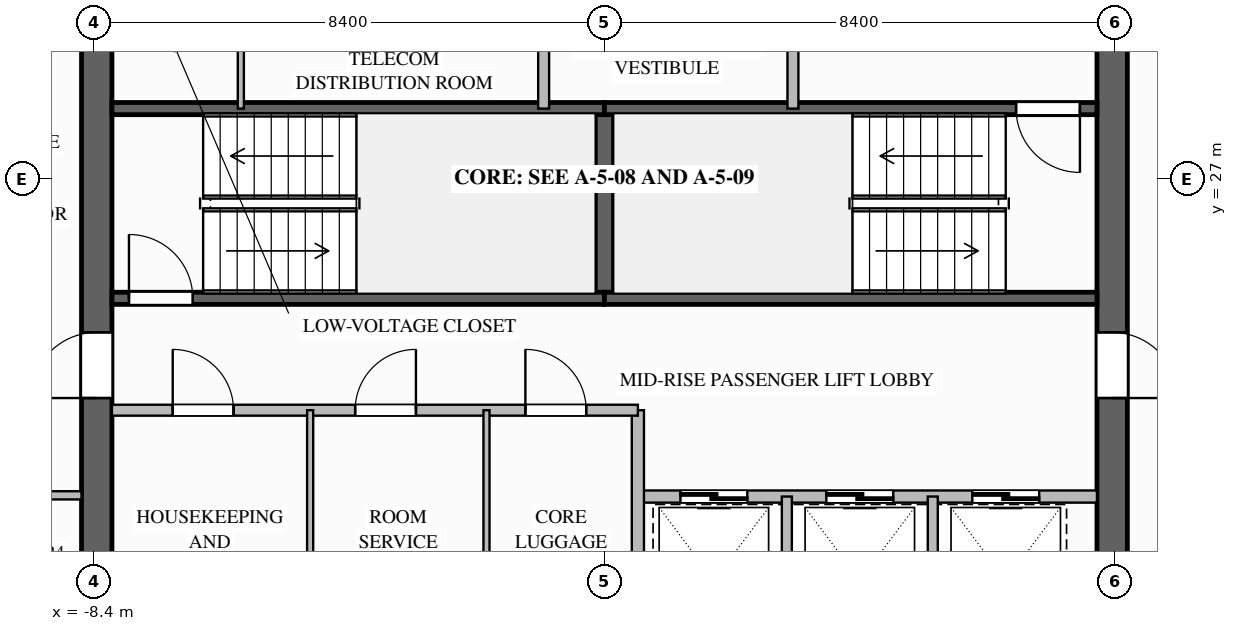
"""IFC4 building model, lengths in metres.
Left out: names, types, materials, properties, quantities, classifications, styles, units other than length and angle.
Written with IfcOpenShell. Run it as: python <this file> out.ifc"""

import sys

from ifc_helpers import new_model, si_unit, direction, frame, frame_2d, origin, place, context, subcontext, project, spatial, rectangle, extrude, element, fill, save


model = new_model("IFC4")
c1 = context("Model", 3, precision=1e-05, world=origin(), true_north=direction((0.0, 1.0)))
c2 = subcontext(c1, "Body", "Model", "MODEL_VIEW")
j1 = project(units=[si_unit("LENGTHUNIT", "METRE"), si_unit("PLANEANGLEUNIT", "RADIAN")], contexts=[c1])
p1 = place(None, origin())
s1 = spatial("IfcSite", under=j1, at=p1, CompositionType="ELEMENT")
p2 = place(p1, origin())
s2 = spatial("IfcBuilding", under=s1, at=p2, CompositionType="ELEMENT")
p3 = place(p2, frame((0.0, 0.0, 193.0)))
s3 = spatial("IfcBuildingStorey", under=s2, at=p3, CompositionType="ELEMENT", Elevation=193.0)
p4 = place(p3, frame((8.35, 35.1, 0.0), z_axis=(0.0, 0.0, 1.0), x_axis=(0.0, -1.0, 0.0)))
e1 = element("IfcWall", 1, at=p4, inside=s3, PredefinedType="SHEAR", context=c2, shape_type="SweptSolid", body=[
    extrude(rectangle(XDim=16.2, YDim=0.5, at=frame_2d((8.1, 0.0))), origin(), (0.0, 0.0, 1.0), 3.55),
])
p5 = place(p4, frame((3.08, 0.0, 0.0)))
e2 = element("IfcOpeningElement", 2, at=p5, cuts=e1, PredefinedType="OPENING", context=c2, shape_type="SweptSolid", body=[
    extrude(rectangle(XDim=1.12, YDim=2.1, at=frame_2d((0.56, 1.05))), frame((0.0, 0.26, 0.0), z_axis=(0.0, -1.0, 0.0), x_axis=(1.0, 0.0, 0.0)), (0.0, 0.0, 1.0), 0.52),
])
p6 = place(p4, frame((10.62, 0.0, 0.0)))
e3 = element("IfcOpeningElement", 3, at=p6, cuts=e1, PredefinedType="OPENING", context=c2, shape_type="SweptSolid", body=[
    extrude(rectangle(XDim=1.08, YDim=2.04, at=frame_2d((0.54, 1.02))), frame((0.0, 0.26, 0.0), z_axis=(0.0, -1.0, 0.0), x_axis=(1.0, 0.0, 0.0)), (0.0, 0.0, 1.0), 0.52),
])
p7 = place(p3, frame((-8.35, 18.9, 0.0), z_axis=(0.0, 0.0, 1.0), x_axis=(0.0, 1.0, 0.0)))
e4 = element("IfcWall", 4, at=p7, inside=s3, PredefinedType="SHEAR", context=c2, shape_type="SweptSolid", body=[
    extrude(rectangle(XDim=16.2, YDim=0.5, at=frame_2d((8.1, 0.0))), origin(), (0.0, 0.0, 1.0), 3.55),
])
p8 = place(p7, frame((12.02, 0.0, 0.0)))
e5 = element("IfcOpeningElement", 5, at=p8, cuts=e4, PredefinedType="OPENING", context=c2, shape_type="SweptSolid", body=[
    extrude(rectangle(XDim=1.08, YDim=2.04, at=frame_2d((0.54, 1.02))), frame((0.0, 0.26, 0.0), z_axis=(0.0, -1.0, 0.0), x_axis=(1.0, 0.0, 0.0)), (0.0, 0.0, 1.0), 0.52),
])
p9 = place(p7, frame((4.5, 0.0, 0.0)))
e6 = element("IfcOpeningElement", 6, at=p9, cuts=e4, PredefinedType="OPENING", context=c2, shape_type="SweptSolid", body=[
    extrude(rectangle(XDim=1.08, YDim=2.04, at=frame_2d((0.54, 1.02))), frame((0.0, 0.26, 0.0), z_axis=(0.0, -1.0, 0.0), x_axis=(1.0, 0.0, 0.0)), (0.0, 0.0, 1.0), 0.52),
])
p10 = place(p3, frame((0.0, 25.04, 0.0), z_axis=(0.0, 0.0, 1.0), x_axis=(0.0, 1.0, 0.0)))
e7 = element("IfcWall", 7, at=p10, inside=s3, PredefinedType="SOLIDWALL", context=c2, shape_type="SweptSolid", body=[
    extrude(rectangle(XDim=3.12, YDim=0.3, at=frame_2d((1.56, 0.0))), origin(), (0.0, 0.0, 1.0), 3.29),
])
p11 = place(p3, frame((-8.1, 25.04, 0.0), z_axis=(0.0, 0.0, 1.0), x_axis=(1.0, 0.0, 0.0)))
e8 = element("IfcWall", 8, at=p11, inside=s3, PredefinedType="SOLIDWALL", context=c2, shape_type="SweptSolid", body=[
    extrude(rectangle(XDim=8.1, YDim=0.2, at=frame_2d((4.05, 0.0))), origin(), (0.0, 0.0, 1.0), 3.29),
])
p12 = place(p11, frame((0.28, 0.0, 0.0)))
e9 = element("IfcOpeningElement", 9, at=p12, cuts=e8, PredefinedType="OPENING", context=c2, shape_type="SweptSolid", body=[
    extrude(rectangle(XDim=1.05, YDim=2.1, at=frame_2d((0.525, 1.05))), frame((0.0, 0.11, 0.0), z_axis=(0.0, -1.0, 0.0), x_axis=(1.0, 0.0, 0.0)), (0.0, 0.0, 1.0), 0.22),
])
for number, where, z_axis, x_axis in (
    (10, (-8.1, 28.16, 0.0), (0.0, 0.0, 1.0), (1.0, 0.0, 0.0)),
    (11, (0.0, 25.04, 0.0), (0.0, 0.0, 1.0), (1.0, 0.0, 0.0)),
):
    element("IfcWall", number, at=place(p3, frame(where, z_axis=z_axis, x_axis=x_axis)), inside=s3, PredefinedType="SOLIDWALL", context=c2, shape_type="SweptSolid", body=[
        extrude(rectangle(XDim=8.1, YDim=0.2, at=frame_2d((4.05, 0.0))), origin(), (0.0, 0.0, 1.0), 3.29),
    ])
p13 = place(p3, frame((8.1, 28.16, 0.0), z_axis=(0.0, 0.0, 1.0), x_axis=(-1.0, 0.0, 0.0)))
e12 = element("IfcWall", 12, at=p13, inside=s3, PredefinedType="SOLIDWALL", context=c2, shape_type="SweptSolid", body=[
    extrude(rectangle(XDim=8.1, YDim=0.2, at=frame_2d((4.05, 0.0))), origin(), (0.0, 0.0, 1.0), 3.29),
])
p14 = place(p13, frame((0.28, 0.0, 0.0)))
e13 = element("IfcOpeningElement", 13, at=p14, cuts=e12, PredefinedType="OPENING", context=c2, shape_type="SweptSolid", body=[
    extrude(rectangle(XDim=1.05, YDim=2.1, at=frame_2d((0.525, 1.05))), frame((0.0, 0.11, 0.0), z_axis=(0.0, -1.0, 0.0), x_axis=(1.0, 0.0, 0.0)), (0.0, 0.0, 1.0), 0.22),
])
p15 = place(p3, frame((3.1, 28.16, 0.0), z_axis=(0.0, 0.0, 1.0), x_axis=(0.0, 1.0, 0.0)))
e14 = element("IfcWall", 14, at=p15, inside=s3, PredefinedType="SOLIDWALL", context=c2, shape_type="SweptSolid", body=[
    extrude(rectangle(XDim=4.06, YDim=0.18, at=frame_2d((2.03, 0.0))), origin(), (0.0, 0.0, 1.0), 3.29),
])
p16 = place(p15, frame((1.4, 0.0, 0.0)))
e15 = element("IfcOpeningElement", 15, at=p16, cuts=e14, PredefinedType="OPENING", context=c2, shape_type="SweptSolid", body=[
    extrude(rectangle(XDim=1.12, YDim=2.1, at=frame_2d((0.56, 1.05))), frame((0.0, 0.1, 0.0), z_axis=(0.0, -1.0, 0.0), x_axis=(1.0, 0.0, 0.0)), (0.0, 0.0, 1.0), 0.2),
])
p17 = place(p3, frame((-1.0, 28.16, 0.0), z_axis=(0.0, 0.0, 1.0), x_axis=(0.0, 1.0, 0.0)))
e16 = element("IfcWall", 16, at=p17, inside=s3, PredefinedType="SOLIDWALL", context=c2, shape_type="SweptSolid", body=[
    extrude(rectangle(XDim=4.02, YDim=0.18, at=frame_2d((2.01, 0.0))), origin(), (0.0, 0.0, 1.0), 3.29),
])
p18 = place(p17, frame((2.49, 0.0, 0.0)))
e17 = element("IfcOpeningElement", 17, at=p18, cuts=e16, PredefinedType="OPENING", context=c2, shape_type="SweptSolid", body=[
    extrude(rectangle(XDim=1.0, YDim=2.1, at=frame_2d((0.5, 1.05))), frame((0.0, 0.1, 0.0), z_axis=(0.0, -1.0, 0.0), x_axis=(1.0, 0.0, 0.0)), (0.0, 0.0, 1.0), 0.2),
])
p19 = place(p3, frame((-5.98, 28.16, 0.0), z_axis=(0.0, 0.0, 1.0), x_axis=(0.0, 1.0, 0.0)))
e18 = element("IfcWall", 18, at=p19, inside=s3, PredefinedType="PARTITIONING", context=c2, shape_type="SweptSolid", body=[
    extrude(rectangle(XDim=1.98, YDim=0.1, at=frame_2d((0.99, 0.0))), origin(), (0.0, 0.0, 1.0), 3.29),
])
p20 = place(p3, frame((8.1, 21.78, 0.0), z_axis=(0.0, 0.0, 1.0), x_axis=(-1.0, 0.0, 0.0)))
e19 = element("IfcWall", 19, at=p20, inside=s3, PredefinedType="SOLIDWALL", context=c2, shape_type="SweptSolid", body=[
    extrude(rectangle(XDim=7.55, YDim=0.2, at=frame_2d((3.775, 0.0))), origin(), (0.0, 0.0, 1.0), 3.29),
])
p21 = place(p20, frame((5.75, 0.0, 0.0)))
e20 = element("IfcOpeningElement", 20, at=p21, cuts=e19, PredefinedType="OPENING", context=c2, shape_type="SweptSolid", body=[
    extrude(rectangle(XDim=1.1, YDim=2.2, at=frame_2d((0.55, 1.1))), frame((0.0, 0.11, 0.0), z_axis=(0.0, -1.0, 0.0), x_axis=(1.0, 0.0, 0.0)), (0.0, 0.0, 1.0), 0.22),
])
p22 = place(p20, frame((3.35, 0.0, 0.0)))
e21 = element("IfcOpeningElement", 21, at=p22, cuts=e19, PredefinedType="OPENING", context=c2, shape_type="SweptSolid", body=[
    extrude(rectangle(XDim=1.1, YDim=2.2, at=frame_2d((0.55, 1.1))), frame((0.0, 0.11, 0.0), z_axis=(0.0, -1.0, 0.0), x_axis=(1.0, 0.0, 0.0)), (0.0, 0.0, 1.0), 0.22),
])
p23 = place(p20, frame((0.95, 0.0, 0.0)))
e22 = element("IfcOpeningElement", 22, at=p23, cuts=e19, PredefinedType="OPENING", context=c2, shape_type="SweptSolid", body=[
    extrude(rectangle(XDim=1.1, YDim=2.2, at=frame_2d((0.55, 1.1))), frame((0.0, 0.11, 0.0), z_axis=(0.0, -1.0, 0.0), x_axis=(1.0, 0.0, 0.0)), (0.0, 0.0, 1.0), 0.22),
])
p24 = place(p3, frame((0.55, 18.9, 0.0), z_axis=(0.0, 0.0, 1.0), x_axis=(0.0, 1.0, 0.0)))
e23 = element("IfcWall", 23, at=p24, inside=s3, PredefinedType="SOLIDWALL", context=c2, shape_type="SweptSolid", body=[
    extrude(rectangle(XDim=4.3, YDim=0.2, at=frame_2d((2.15, 0.0))), origin(), (0.0, 0.0, 1.0), 3.29),
])
for number, where, z_axis, x_axis in (
    (24, (3.0, 18.9, 0.0), (0.0, 0.0, 1.0), (0.0, 1.0, 0.0)),
    (25, (5.4, 18.9, 0.0), (0.0, 0.0, 1.0), (0.0, 1.0, 0.0)),
):
    element("IfcWall", number, at=place(p3, frame(where, z_axis=z_axis, x_axis=x_axis)), inside=s3, PredefinedType="PARTITIONING", context=c2, shape_type="SweptSolid", body=[
        extrude(rectangle(XDim=2.88, YDim=0.165, at=frame_2d((1.44, 0.0))), origin(), (0.0, 0.0, 1.0), 3.29),
    ])
p25 = place(p3, frame((-8.1, 23.2, 0.0), z_axis=(0.0, 0.0, 1.0), x_axis=(1.0, 0.0, 0.0)))
e26 = element("IfcWall", 26, at=p25, inside=s3, PredefinedType="SOLIDWALL", context=c2, shape_type="SweptSolid", body=[
    extrude(rectangle(XDim=8.65, YDim=0.18, at=frame_2d((4.325, 0.0))), origin(), (0.0, 0.0, 1.0), 3.29),
])
p26 = place(p25, frame((1.0, 0.0, 0.0)))
e27 = element("IfcOpeningElement", 27, at=p26, cuts=e26, PredefinedType="OPENING", context=c2, shape_type="SweptSolid", body=[
    extrude(rectangle(XDim=1.0, YDim=2.1, at=frame_2d((0.5, 1.05))), frame((0.0, 0.1, 0.0), z_axis=(0.0, -1.0, 0.0), x_axis=(1.0, 0.0, 0.0)), (0.0, 0.0, 1.0), 0.2),
])
p27 = place(p25, frame((4.0, 0.0, 0.0)))
e28 = element("IfcOpeningElement", 28, at=p27, cuts=e26, PredefinedType="OPENING", context=c2, shape_type="SweptSolid", body=[
    extrude(rectangle(XDim=1.0, YDim=2.1, at=frame_2d((0.5, 1.05))), frame((0.0, 0.1, 0.0), z_axis=(0.0, -1.0, 0.0), x_axis=(1.0, 0.0, 0.0)), (0.0, 0.0, 1.0), 0.2),
])
p28 = place(p25, frame((6.8, 0.0, 0.0)))
e29 = element("IfcOpeningElement", 29, at=p28, cuts=e26, PredefinedType="OPENING", context=c2, shape_type="SweptSolid", body=[
    extrude(rectangle(XDim=1.0, YDim=2.1, at=frame_2d((0.5, 1.05))), frame((0.0, 0.1, 0.0), z_axis=(0.0, -1.0, 0.0), x_axis=(1.0, 0.0, 0.0)), (0.0, 0.0, 1.0), 0.2),
])
for number, where, z_axis, x_axis in (
    (30, (-4.84, 18.9, 0.0), (0.0, 0.0, 1.0), (0.0, 1.0, 0.0)),
    (31, (-1.94, 18.9, 0.0), (0.0, 0.0, 1.0), (0.0, 1.0, 0.0)),
):
    element("IfcWall", number, at=place(p3, frame(where, z_axis=z_axis, x_axis=x_axis)), inside=s3, PredefinedType="PARTITIONING", context=c2, shape_type="SweptSolid", body=[
        extrude(rectangle(XDim=4.3, YDim=0.1, at=frame_2d((2.15, 0.0))), origin(), (0.0, 0.0, 1.0), 3.29),
    ])
p29 = place(p3, frame((-10.7, 21.8, 0.0), z_axis=(0.0, 0.0, 1.0), x_axis=(1.0, 0.0, 0.0)))
e32 = element("IfcWall", 32, at=p29, inside=s3, PredefinedType="PARTITIONING", context=c2, shape_type="SweptSolid", body=[
    extrude(rectangle(XDim=2.1, YDim=0.135, at=frame_2d((1.05, 0.0))), origin(), (0.0, 0.0, 1.0), 3.29),
])
p30 = place(p29, frame((0.55, 0.0, 0.0)))
e33 = element("IfcOpeningElement", 33, at=p30, cuts=e32, PredefinedType="OPENING", context=c2, shape_type="SweptSolid", body=[
    extrude(rectangle(XDim=0.92, YDim=2.1, at=frame_2d((0.46, 1.05))), frame((0.0, 0.077, 0.0), z_axis=(0.0, -1.0, 0.0), x_axis=(1.0, 0.0, 0.0)), (0.0, 0.0, 1.0), 0.155),
])
p31 = place(p12, origin())
e34 = element("IfcDoor", 34, at=p31, inside=s3, OperationType="SINGLE_SWING_LEFT", PredefinedType="DOOR", context=c2, shape_type="SweptSolid", body=[
    extrude(rectangle(XDim=1.05, YDim=2.1, at=frame_2d((0.525, 1.05))), frame((0.0, 0.025, 0.0), z_axis=(0.0, -1.0, 0.0), x_axis=(1.0, 0.0, 0.0)), (0.0, 0.0, 1.0), 0.05),
])
fill(e9, e34)
p32 = place(p14, origin())
e35 = element("IfcDoor", 35, at=p32, inside=s3, OperationType="SINGLE_SWING_LEFT", PredefinedType="DOOR", context=c2, shape_type="SweptSolid", body=[
    extrude(rectangle(XDim=1.05, YDim=2.1, at=frame_2d((0.525, 1.05))), frame((0.0, 0.025, 0.0), z_axis=(0.0, -1.0, 0.0), x_axis=(1.0, 0.0, 0.0)), (0.0, 0.0, 1.0), 0.05),
])
fill(e13, e35)
p33 = place(p21, origin())
e36 = element("IfcDoor", 36, at=p33, inside=s3, OperationType="SLIDING_TO_LEFT", PredefinedType="DOOR", context=c2, shape_type="SweptSolid", body=[
    extrude(rectangle(XDim=1.1, YDim=2.2, at=frame_2d((0.55, 1.1))), frame((0.0, 0.025, 0.0), z_axis=(0.0, -1.0, 0.0), x_axis=(1.0, 0.0, 0.0)), (0.0, 0.0, 1.0), 0.05),
])
fill(e20, e36)
p34 = place(p22, origin())
e37 = element("IfcDoor", 37, at=p34, inside=s3, OperationType="SLIDING_TO_LEFT", PredefinedType="DOOR", context=c2, shape_type="SweptSolid", body=[
    extrude(rectangle(XDim=1.1, YDim=2.2, at=frame_2d((0.55, 1.1))), frame((0.0, 0.025, 0.0), z_axis=(0.0, -1.0, 0.0), x_axis=(1.0, 0.0, 0.0)), (0.0, 0.0, 1.0), 0.05),
])
fill(e21, e37)
p35 = place(p23, origin())
e38 = element("IfcDoor", 38, at=p35, inside=s3, OperationType="SLIDING_TO_LEFT", PredefinedType="DOOR", context=c2, shape_type="SweptSolid", body=[
    extrude(rectangle(XDim=1.1, YDim=2.2, at=frame_2d((0.55, 1.1))), frame((0.0, 0.025, 0.0), z_axis=(0.0, -1.0, 0.0), x_axis=(1.0, 0.0, 0.0)), (0.0, 0.0, 1.0), 0.05),
])
fill(e22, e38)
p36 = place(p9, origin())
e39 = element("IfcDoor", 39, at=p36, inside=s3, OperationType="SINGLE_SWING_LEFT", PredefinedType="DOOR", context=c2, shape_type="SweptSolid", body=[
    extrude(rectangle(XDim=1.08, YDim=2.04, at=frame_2d((0.54, 1.02))), frame((0.0, 0.025, 0.0), z_axis=(0.0, -1.0, 0.0), x_axis=(1.0, 0.0, 0.0)), (0.0, 0.0, 1.0), 0.05),
])
fill(e6, e39)
p37 = place(p6, origin())
e40 = element("IfcDoor", 40, at=p37, inside=s3, OperationType="SINGLE_SWING_RIGHT", PredefinedType="DOOR", context=c2, shape_type="SweptSolid", body=[
    extrude(rectangle(XDim=1.08, YDim=2.04, at=frame_2d((0.54, 1.02))), frame((0.0, 0.025, 0.0), z_axis=(0.0, -1.0, 0.0), x_axis=(1.0, 0.0, 0.0)), (0.0, 0.0, 1.0), 0.05),
])
fill(e3, e40)
p38 = place(p26, origin())
e41 = element("IfcDoor", 41, at=p38, inside=s3, OperationType="SINGLE_SWING_LEFT", PredefinedType="DOOR", context=c2, shape_type="SweptSolid", body=[
    extrude(rectangle(XDim=1.0, YDim=2.1, at=frame_2d((0.5, 1.05))), frame((0.0, 0.025, 0.0), z_axis=(0.0, -1.0, 0.0), x_axis=(1.0, 0.0, 0.0)), (0.0, 0.0, 1.0), 0.05),
])
fill(e27, e41)
p39 = place(p27, origin())
e42 = element("IfcDoor", 42, at=p39, inside=s3, OperationType="SINGLE_SWING_RIGHT", PredefinedType="DOOR", context=c2, shape_type="SweptSolid", body=[
    extrude(rectangle(XDim=1.0, YDim=2.1, at=frame_2d((0.5, 1.05))), frame((0.0, 0.025, 0.0), z_axis=(0.0, -1.0, 0.0), x_axis=(1.0, 0.0, 0.0)), (0.0, 0.0, 1.0), 0.05),
])
fill(e28, e42)
p40 = place(p28, origin())
e43 = element("IfcDoor", 43, at=p40, inside=s3, OperationType="SINGLE_SWING_LEFT", PredefinedType="DOOR", context=c2, shape_type="SweptSolid", body=[
    extrude(rectangle(XDim=1.0, YDim=2.1, at=frame_2d((0.5, 1.05))), frame((0.0, 0.025, 0.0), z_axis=(0.0, -1.0, 0.0), x_axis=(1.0, 0.0, 0.0)), (0.0, 0.0, 1.0), 0.05),
])
fill(e29, e43)
save(model, sys.argv[1])
